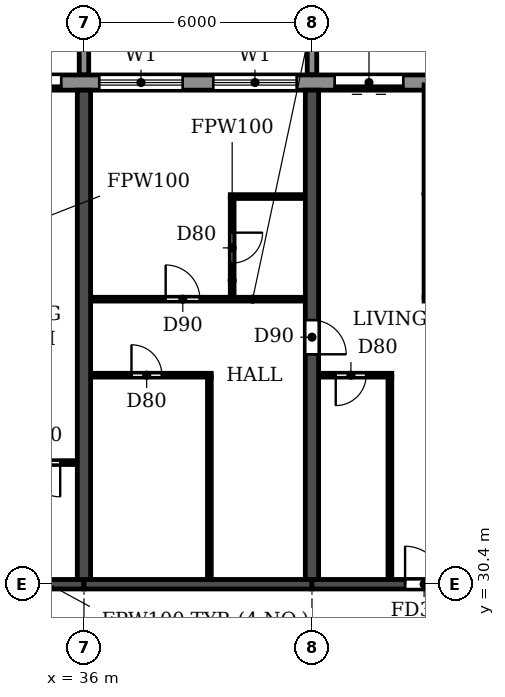
"""IFC4 building model, lengths in metres.
Left out: names, types, materials, properties, quantities, classifications, styles, units other than length and angle.
Written with IfcOpenShell. Run it as: python <this file> out.ifc"""

import sys

from ifc_helpers import new_model, si_unit, direction, frame, frame_2d, origin, place, context, subcontext, project, spatial, polyline, rectangle, outline, extrude, source, transform, mapped, element, fill, save


model = new_model("IFC4")
c1 = context("Model", 3, precision=1e-05, world=origin(), true_north=direction((0.0, 1.0)))
c2 = subcontext(c1, "Body", "Model", "MODEL_VIEW")
j1 = project(units=[si_unit("LENGTHUNIT", "METRE"), si_unit("PLANEANGLEUNIT", "RADIAN")], contexts=[c1])
p1 = place(None, origin())
s1 = spatial("IfcSite", under=j1, at=p1, CompositionType="ELEMENT")
p2 = place(p1, origin())
s2 = spatial("IfcBuilding", under=s1, at=p2, CompositionType="ELEMENT")
p3 = place(p2, frame((0.0, 0.0, 76.2)))
s3 = spatial("IfcBuildingStorey", under=s2, at=p3, CompositionType="ELEMENT", Elevation=76.2)
p4 = place(p3, frame((36.0, 30.525, 0.0), z_axis=(0.0, 0.0, 1.0), x_axis=(0.0, 1.0, 0.0)))
e1 = element("IfcWall", 1, at=p4, inside=s3, PredefinedType="SHEAR", context=c2, shape_type="SweptSolid", body=[
    extrude(rectangle(XDim=12.875, YDim=0.35, at=frame_2d((6.438, 0.0))), origin(), (0.0, 0.0, 1.0), 3.06),
])
p5 = place(p3, frame((42.0, 30.525, 0.0), z_axis=(0.0, 0.0, 1.0), x_axis=(0.0, 1.0, 0.0)))
e2 = element("IfcWall", 2, at=p5, inside=s3, PredefinedType="SHEAR", context=c2, shape_type="SweptSolid", body=[
    extrude(rectangle(XDim=12.875, YDim=0.35, at=frame_2d((6.438, 0.0))), origin(), (0.0, 0.0, 1.0), 3.06),
])
p6 = place(p5, frame((5.925, 0.0, 0.0)))
e3 = element("IfcOpeningElement", 3, at=p6, cuts=e2, PredefinedType="OPENING", context=c2, shape_type="SweptSolid", body=[
    extrude(rectangle(XDim=0.9, YDim=2.1, at=frame_2d((0.45, 1.05))), frame((0.0, 0.185, 0.0), z_axis=(0.0, -1.0, 0.0), x_axis=(1.0, 0.0, 0.0)), (0.0, 0.0, 1.0), 0.37),
])
p7 = place(p3, frame((30.0, 30.4, 0.0), z_axis=(0.0, 0.0, 1.0), x_axis=(1.0, 0.0, 0.0)))
e4 = element("IfcWall", 4, at=p7, inside=s3, PredefinedType="SHEAR", context=c2, shape_type="SweptSolid", body=[
    extrude(rectangle(XDim=6.0, YDim=0.25, at=frame_2d((3.0, 0.0))), origin(), (0.0, 0.0, 1.0), 2.46),
])
p8 = place(p7, frame((2.45, 0.0, 0.0)))
e5 = element("IfcOpeningElement", 5, at=p8, cuts=e4, PredefinedType="OPENING", context=c2, shape_type="SweptSolid", body=[
    extrude(rectangle(XDim=1.0, YDim=2.1, at=frame_2d((0.5, 1.05))), frame((0.0, 0.135, 0.0), z_axis=(0.0, -1.0, 0.0), x_axis=(1.0, 0.0, 0.0)), (0.0, 0.0, 1.0), 0.27),
])
p9 = place(p3, frame((36.0, 30.4, 0.0), z_axis=(0.0, 0.0, 1.0), x_axis=(1.0, 0.0, 0.0)))
e6 = element("IfcWall", 6, at=p9, inside=s3, PredefinedType="SHEAR", context=c2, shape_type="SweptSolid", body=[
    extrude(rectangle(XDim=6.0, YDim=0.25, at=frame_2d((3.0, 0.0))), origin(), (0.0, 0.0, 1.0), 2.46),
])
p10 = place(p3, frame((42.0, 30.4, 0.0), z_axis=(0.0, 0.0, 1.0), x_axis=(1.0, 0.0, 0.0)))
e7 = element("IfcWall", 7, at=p10, inside=s3, PredefinedType="SHEAR", context=c2, shape_type="SweptSolid", body=[
    extrude(rectangle(XDim=6.0, YDim=0.25, at=frame_2d((3.0, 0.0))), origin(), (0.0, 0.0, 1.0), 2.46),
])
p11 = place(p10, frame((2.45, 0.0, 0.0)))
e8 = element("IfcOpeningElement", 8, at=p11, cuts=e7, PredefinedType="OPENING", context=c2, shape_type="SweptSolid", body=[
    extrude(rectangle(XDim=1.0, YDim=2.1, at=frame_2d((0.5, 1.05))), frame((0.0, 0.135, 0.0), z_axis=(0.0, -1.0, 0.0), x_axis=(1.0, 0.0, 0.0)), (0.0, 0.0, 1.0), 0.27),
])
p12 = place(p3, frame((91.317, 43.6, 0.0), z_axis=(0.0, 0.0, 1.0), x_axis=(-1.0, 0.0, 0.0)))
e9 = element("IfcWall", 9, at=p12, inside=s3, PredefinedType="STANDARD", context=c2, shape_type="SweptSolid", body=[
    extrude(rectangle(XDim=80.634, YDim=0.4, at=frame_2d((40.317, 0.0))), origin(), (0.0, 0.0, 1.0), 3.06),
])
p13 = place(p12, frame((76.717, 0.0, 0.9)))
e10 = element("IfcOpeningElement", 10, at=p13, cuts=e9, PredefinedType="OPENING", context=c2, shape_type="SweptSolid", body=[
    extrude(rectangle(XDim=2.2, YDim=1.5, at=frame_2d((1.1, 0.75))), frame((0.0, 0.21, 0.0), z_axis=(0.0, -1.0, 0.0), x_axis=(1.0, 0.0, 0.0)), (0.0, 0.0, 1.0), 0.42),
])
p14 = place(p12, frame((73.917, 0.0, 0.0)))
e11 = element("IfcOpeningElement", 11, at=p14, cuts=e9, PredefinedType="OPENING", context=c2, shape_type="SweptSolid", body=[
    extrude(rectangle(XDim=1.8, YDim=2.4, at=frame_2d((0.9, 1.2))), frame((0.0, 0.21, 0.0), z_axis=(0.0, -1.0, 0.0), x_axis=(1.0, 0.0, 0.0)), (0.0, 0.0, 1.0), 0.42),
])
p15 = place(p12, frame((70.917, 0.0, 0.0)))
e12 = element("IfcOpeningElement", 12, at=p15, cuts=e9, PredefinedType="OPENING", context=c2, shape_type="SweptSolid", body=[
    extrude(rectangle(XDim=1.8, YDim=2.4, at=frame_2d((0.9, 1.2))), frame((0.0, 0.21, 0.0), z_axis=(0.0, -1.0, 0.0), x_axis=(1.0, 0.0, 0.0)), (0.0, 0.0, 1.0), 0.42),
])
p16 = place(p12, frame((67.717, 0.0, 0.9)))
e13 = element("IfcOpeningElement", 13, at=p16, cuts=e9, PredefinedType="OPENING", context=c2, shape_type="SweptSolid", body=[
    extrude(rectangle(XDim=2.2, YDim=1.5, at=frame_2d((1.1, 0.75))), frame((0.0, 0.21, 0.0), z_axis=(0.0, -1.0, 0.0), x_axis=(1.0, 0.0, 0.0)), (0.0, 0.0, 1.0), 0.42),
])
p17 = place(p12, frame((64.717, 0.0, 0.9)))
e14 = element("IfcOpeningElement", 14, at=p17, cuts=e9, PredefinedType="OPENING", context=c2, shape_type="SweptSolid", body=[
    extrude(rectangle(XDim=2.2, YDim=1.5, at=frame_2d((1.1, 0.75))), frame((0.0, 0.21, 0.0), z_axis=(0.0, -1.0, 0.0), x_axis=(1.0, 0.0, 0.0)), (0.0, 0.0, 1.0), 0.42),
])
p18 = place(p12, frame((61.917, 0.0, 0.0)))
e15 = element("IfcOpeningElement", 15, at=p18, cuts=e9, PredefinedType="OPENING", context=c2, shape_type="SweptSolid", body=[
    extrude(rectangle(XDim=1.8, YDim=2.4, at=frame_2d((0.9, 1.2))), frame((0.0, 0.21, 0.0), z_axis=(0.0, -1.0, 0.0), x_axis=(1.0, 0.0, 0.0)), (0.0, 0.0, 1.0), 0.42),
])
p19 = place(p12, frame((58.717, 0.0, 0.9)))
e16 = element("IfcOpeningElement", 16, at=p19, cuts=e9, PredefinedType="OPENING", context=c2, shape_type="SweptSolid", body=[
    extrude(rectangle(XDim=2.2, YDim=1.5, at=frame_2d((1.1, 0.75))), frame((0.0, 0.21, 0.0), z_axis=(0.0, -1.0, 0.0), x_axis=(1.0, 0.0, 0.0)), (0.0, 0.0, 1.0), 0.42),
])
p20 = place(p12, frame((55.917, 0.0, 0.0)))
e17 = element("IfcOpeningElement", 17, at=p20, cuts=e9, PredefinedType="OPENING", context=c2, shape_type="SweptSolid", body=[
    extrude(rectangle(XDim=1.8, YDim=2.4, at=frame_2d((0.9, 1.2))), frame((0.0, 0.21, 0.0), z_axis=(0.0, -1.0, 0.0), x_axis=(1.0, 0.0, 0.0)), (0.0, 0.0, 1.0), 0.42),
])
p21 = place(p12, frame((52.717, 0.0, 0.9)))
e18 = element("IfcOpeningElement", 18, at=p21, cuts=e9, PredefinedType="OPENING", context=c2, shape_type="SweptSolid", body=[
    extrude(rectangle(XDim=2.2, YDim=1.5, at=frame_2d((1.1, 0.75))), frame((0.0, 0.21, 0.0), z_axis=(0.0, -1.0, 0.0), x_axis=(1.0, 0.0, 0.0)), (0.0, 0.0, 1.0), 0.42),
])
p22 = place(p12, frame((49.717, 0.0, 0.9)))
e19 = element("IfcOpeningElement", 19, at=p22, cuts=e9, PredefinedType="OPENING", context=c2, shape_type="SweptSolid", body=[
    extrude(rectangle(XDim=2.2, YDim=1.5, at=frame_2d((1.1, 0.75))), frame((0.0, 0.21, 0.0), z_axis=(0.0, -1.0, 0.0), x_axis=(1.0, 0.0, 0.0)), (0.0, 0.0, 1.0), 0.42),
])
p23 = place(p12, frame((46.917, 0.0, 0.0)))
e20 = element("IfcOpeningElement", 20, at=p23, cuts=e9, PredefinedType="OPENING", context=c2, shape_type="SweptSolid", body=[
    extrude(rectangle(XDim=1.8, YDim=2.4, at=frame_2d((0.9, 1.2))), frame((0.0, 0.21, 0.0), z_axis=(0.0, -1.0, 0.0), x_axis=(1.0, 0.0, 0.0)), (0.0, 0.0, 1.0), 0.42),
])
p24 = place(p12, frame((43.717, 0.0, 0.9)))
e21 = element("IfcOpeningElement", 21, at=p24, cuts=e9, PredefinedType="OPENING", context=c2, shape_type="SweptSolid", body=[
    extrude(rectangle(XDim=2.2, YDim=1.5, at=frame_2d((1.1, 0.75))), frame((0.0, 0.21, 0.0), z_axis=(0.0, -1.0, 0.0), x_axis=(1.0, 0.0, 0.0)), (0.0, 0.0, 1.0), 0.42),
])
p25 = place(p12, frame((40.717, 0.0, 0.9)))
e22 = element("IfcOpeningElement", 22, at=p25, cuts=e9, PredefinedType="OPENING", context=c2, shape_type="SweptSolid", body=[
    extrude(rectangle(XDim=2.2, YDim=1.5, at=frame_2d((1.1, 0.75))), frame((0.0, 0.21, 0.0), z_axis=(0.0, -1.0, 0.0), x_axis=(1.0, 0.0, 0.0)), (0.0, 0.0, 1.0), 0.42),
])
p26 = place(p12, frame((37.917, 0.0, 0.0)))
e23 = element("IfcOpeningElement", 23, at=p26, cuts=e9, PredefinedType="OPENING", context=c2, shape_type="SweptSolid", body=[
    extrude(rectangle(XDim=1.8, YDim=2.4, at=frame_2d((0.9, 1.2))), frame((0.0, 0.21, 0.0), z_axis=(0.0, -1.0, 0.0), x_axis=(1.0, 0.0, 0.0)), (0.0, 0.0, 1.0), 0.42),
])
p27 = place(p12, frame((34.717, 0.0, 0.9)))
e24 = element("IfcOpeningElement", 24, at=p27, cuts=e9, PredefinedType="OPENING", context=c2, shape_type="SweptSolid", body=[
    extrude(rectangle(XDim=2.2, YDim=1.5, at=frame_2d((1.1, 0.75))), frame((0.0, 0.21, 0.0), z_axis=(0.0, -1.0, 0.0), x_axis=(1.0, 0.0, 0.0)), (0.0, 0.0, 1.0), 0.42),
])
p28 = place(p12, frame((31.917, 0.0, 0.0)))
e25 = element("IfcOpeningElement", 25, at=p28, cuts=e9, PredefinedType="OPENING", context=c2, shape_type="SweptSolid", body=[
    extrude(rectangle(XDim=1.8, YDim=2.4, at=frame_2d((0.9, 1.2))), frame((0.0, 0.21, 0.0), z_axis=(0.0, -1.0, 0.0), x_axis=(1.0, 0.0, 0.0)), (0.0, 0.0, 1.0), 0.42),
])
p29 = place(p12, frame((28.717, 0.0, 0.9)))
e26 = element("IfcOpeningElement", 26, at=p29, cuts=e9, PredefinedType="OPENING", context=c2, shape_type="SweptSolid", body=[
    extrude(rectangle(XDim=2.2, YDim=1.5, at=frame_2d((1.1, 0.75))), frame((0.0, 0.21, 0.0), z_axis=(0.0, -1.0, 0.0), x_axis=(1.0, 0.0, 0.0)), (0.0, 0.0, 1.0), 0.42),
])
p30 = place(p12, frame((25.717, 0.0, 0.9)))
e27 = element("IfcOpeningElement", 27, at=p30, cuts=e9, PredefinedType="OPENING", context=c2, shape_type="SweptSolid", body=[
    extrude(rectangle(XDim=2.2, YDim=1.5, at=frame_2d((1.1, 0.75))), frame((0.0, 0.21, 0.0), z_axis=(0.0, -1.0, 0.0), x_axis=(1.0, 0.0, 0.0)), (0.0, 0.0, 1.0), 0.42),
])
p31 = place(p12, frame((22.717, 0.0, 0.9)))
e28 = element("IfcOpeningElement", 28, at=p31, cuts=e9, PredefinedType="OPENING", context=c2, shape_type="SweptSolid", body=[
    extrude(rectangle(XDim=2.2, YDim=1.5, at=frame_2d((1.1, 0.75))), frame((0.0, 0.21, 0.0), z_axis=(0.0, -1.0, 0.0), x_axis=(1.0, 0.0, 0.0)), (0.0, 0.0, 1.0), 0.42),
])
p32 = place(p12, frame((19.917, 0.0, 0.0)))
e29 = element("IfcOpeningElement", 29, at=p32, cuts=e9, PredefinedType="OPENING", context=c2, shape_type="SweptSolid", body=[
    extrude(rectangle(XDim=1.8, YDim=2.4, at=frame_2d((0.9, 1.2))), frame((0.0, 0.21, 0.0), z_axis=(0.0, -1.0, 0.0), x_axis=(1.0, 0.0, 0.0)), (0.0, 0.0, 1.0), 0.42),
])
p33 = place(p12, frame((16.717, 0.0, 0.9)))
e30 = element("IfcOpeningElement", 30, at=p33, cuts=e9, PredefinedType="OPENING", context=c2, shape_type="SweptSolid", body=[
    extrude(rectangle(XDim=2.2, YDim=1.5, at=frame_2d((1.1, 0.75))), frame((0.0, 0.21, 0.0), z_axis=(0.0, -1.0, 0.0), x_axis=(1.0, 0.0, 0.0)), (0.0, 0.0, 1.0), 0.42),
])
p34 = place(p12, frame((13.717, 0.0, 0.9)))
e31 = element("IfcOpeningElement", 31, at=p34, cuts=e9, PredefinedType="OPENING", context=c2, shape_type="SweptSolid", body=[
    extrude(rectangle(XDim=2.2, YDim=1.5, at=frame_2d((1.1, 0.75))), frame((0.0, 0.21, 0.0), z_axis=(0.0, -1.0, 0.0), x_axis=(1.0, 0.0, 0.0)), (0.0, 0.0, 1.0), 0.42),
])
p35 = place(p12, frame((10.717, 0.0, 0.9)))
e32 = element("IfcOpeningElement", 32, at=p35, cuts=e9, PredefinedType="OPENING", context=c2, shape_type="SweptSolid", body=[
    extrude(rectangle(XDim=2.2, YDim=1.5, at=frame_2d((1.1, 0.75))), frame((0.0, 0.21, 0.0), z_axis=(0.0, -1.0, 0.0), x_axis=(1.0, 0.0, 0.0)), (0.0, 0.0, 1.0), 0.42),
])
p36 = place(p12, frame((7.917, 0.0, 0.0)))
e33 = element("IfcOpeningElement", 33, at=p36, cuts=e9, PredefinedType="OPENING", context=c2, shape_type="SweptSolid", body=[
    extrude(rectangle(XDim=1.8, YDim=2.4, at=frame_2d((0.9, 1.2))), frame((0.0, 0.21, 0.0), z_axis=(0.0, -1.0, 0.0), x_axis=(1.0, 0.0, 0.0)), (0.0, 0.0, 1.0), 0.42),
])
p37 = place(p12, frame((4.717, 0.0, 0.9)))
e34 = element("IfcOpeningElement", 34, at=p37, cuts=e9, PredefinedType="OPENING", context=c2, shape_type="SweptSolid", body=[
    extrude(rectangle(XDim=2.2, YDim=1.5, at=frame_2d((1.1, 0.75))), frame((0.0, 0.21, 0.0), z_axis=(0.0, -1.0, 0.0), x_axis=(1.0, 0.0, 0.0)), (0.0, 0.0, 1.0), 0.42),
])
p38 = place(p12, frame((1.917, 0.0, 0.0)))
e35 = element("IfcOpeningElement", 35, at=p38, cuts=e9, PredefinedType="OPENING", context=c2, shape_type="SweptSolid", body=[
    extrude(rectangle(XDim=1.8, YDim=2.4, at=frame_2d((0.9, 1.2))), frame((0.0, 0.21, 0.0), z_axis=(0.0, -1.0, 0.0), x_axis=(1.0, 0.0, 0.0)), (0.0, 0.0, 1.0), 0.42),
])
m1 = source(origin(), c2, "Body", "SweptSolid", [
    extrude(outline(polyline([(0.0, 0.0), (0.25, 0.0), (0.25, 3.1), (0.0, 3.1), (0.0, 0.0)])), origin(), (0.0, 0.0, 1.0), 3.1),
])
for number, where in (
    (36, (35.875, 43.8, 0.0)),
    (37, (41.875, 43.8, 0.0)),
):
    element("IfcWall", number, at=place(p3, frame(where)), inside=s3, PredefinedType="STANDARD", context=c2, shape_type="MappedRepresentation", body=[
        mapped(m1, transform((0.0, 0.0, 0.0))),
    ])
p39 = place(p3, frame((33.8, 33.6, 0.0), z_axis=(0.0, 0.0, 1.0), x_axis=(1.0, 0.0, 0.0)))
e38 = element("IfcWall", 38, at=p39, inside=s3, PredefinedType="PARTITIONING", context=c2, shape_type="SweptSolid", body=[
    extrude(rectangle(XDim=2.015, YDim=0.1, at=frame_2d((1.007, 0.0))), origin(), (0.0, 0.0, 1.0), 3.06),
])
p40 = place(p39, frame((0.675, 0.0, 0.0)))
e39 = element("IfcOpeningElement", 39, at=p40, cuts=e38, PredefinedType="OPENING", context=c2, shape_type="SweptSolid", body=[
    extrude(rectangle(XDim=0.9, YDim=2.1, at=frame_2d((0.45, 1.05))), frame((0.0, 0.06, 0.0), z_axis=(0.0, -1.0, 0.0), x_axis=(1.0, 0.0, 0.0)), (0.0, 0.0, 1.0), 0.12),
])
p41 = place(p3, frame((36.185, 35.9, 0.0), z_axis=(0.0, 0.0, 1.0), x_axis=(1.0, 0.0, 0.0)))
e40 = element("IfcWall", 40, at=p41, inside=s3, PredefinedType="PARTITIONING", context=c2, shape_type="SweptSolid", body=[
    extrude(rectangle(XDim=3.165, YDim=0.1, at=frame_2d((1.583, 0.0))), origin(), (0.0, 0.0, 1.0), 3.06),
])
p42 = place(p41, frame((1.065, 0.0, 0.0)))
e41 = element("IfcOpeningElement", 41, at=p42, cuts=e40, PredefinedType="OPENING", context=c2, shape_type="SweptSolid", body=[
    extrude(rectangle(XDim=0.8, YDim=2.1, at=frame_2d((0.4, 1.05))), frame((0.0, 0.06, 0.0), z_axis=(0.0, -1.0, 0.0), x_axis=(1.0, 0.0, 0.0)), (0.0, 0.0, 1.0), 0.12),
])
p43 = place(p3, frame((42.185, 35.9, 0.0), z_axis=(0.0, 0.0, 1.0), x_axis=(1.0, 0.0, 0.0)))
e42 = element("IfcWall", 42, at=p43, inside=s3, PredefinedType="PARTITIONING", context=c2, shape_type="SweptSolid", body=[
    extrude(rectangle(XDim=1.915, YDim=0.1, at=frame_2d((0.958, 0.0))), origin(), (0.0, 0.0, 1.0), 3.06),
])
p44 = place(p43, frame((0.44, 0.0, 0.0)))
e43 = element("IfcOpeningElement", 43, at=p44, cuts=e42, PredefinedType="OPENING", context=c2, shape_type="SweptSolid", body=[
    extrude(rectangle(XDim=0.8, YDim=2.1, at=frame_2d((0.4, 1.05))), frame((0.0, 0.06, 0.0), z_axis=(0.0, -1.0, 0.0), x_axis=(1.0, 0.0, 0.0)), (0.0, 0.0, 1.0), 0.12),
])
p45 = place(p3, frame((36.185, 37.9, 0.0), z_axis=(0.0, 0.0, 1.0), x_axis=(1.0, 0.0, 0.0)))
e44 = element("IfcWall", 44, at=p45, inside=s3, PredefinedType="PARTITIONING", context=c2, shape_type="SweptSolid", body=[
    extrude(rectangle(XDim=5.63, YDim=0.1, at=frame_2d((2.815, 0.0))), origin(), (0.0, 0.0, 1.0), 3.06),
])
p46 = place(p45, frame((1.965, 0.0, 0.0)))
e45 = element("IfcOpeningElement", 45, at=p46, cuts=e44, PredefinedType="OPENING", context=c2, shape_type="SweptSolid", body=[
    extrude(rectangle(XDim=0.9, YDim=2.1, at=frame_2d((0.45, 1.05))), frame((0.0, 0.06, 0.0), z_axis=(0.0, -1.0, 0.0), x_axis=(1.0, 0.0, 0.0)), (0.0, 0.0, 1.0), 0.12),
])
p47 = place(p3, frame((44.95, 37.9, 0.0), z_axis=(0.0, 0.0, 1.0), x_axis=(1.0, 0.0, 0.0)))
e46 = element("IfcWall", 46, at=p47, inside=s3, PredefinedType="PARTITIONING", context=c2, shape_type="SweptSolid", body=[
    extrude(rectangle(XDim=2.865, YDim=0.1, at=frame_2d((1.433, 0.0))), origin(), (0.0, 0.0, 1.0), 3.06),
])
p48 = place(p47, frame((1.65, 0.0, 0.0)))
e47 = element("IfcOpeningElement", 47, at=p48, cuts=e46, PredefinedType="OPENING", context=c2, shape_type="SweptSolid", body=[
    extrude(rectangle(XDim=0.9, YDim=2.1, at=frame_2d((0.45, 1.05))), frame((0.0, 0.06, 0.0), z_axis=(0.0, -1.0, 0.0), x_axis=(1.0, 0.0, 0.0)), (0.0, 0.0, 1.0), 0.12),
])
p49 = place(p3, frame((39.85, 40.6, 0.0), z_axis=(0.0, 0.0, 1.0), x_axis=(1.0, 0.0, 0.0)))
e48 = element("IfcWall", 48, at=p49, inside=s3, PredefinedType="PARTITIONING", context=c2, shape_type="SweptSolid", body=[
    extrude(rectangle(XDim=1.965, YDim=0.1, at=frame_2d((0.982, 0.0))), origin(), (0.0, 0.0, 1.0), 3.06),
])
p50 = place(p3, frame((39.3, 30.535, 0.0), z_axis=(0.0, 0.0, 1.0), x_axis=(0.0, 1.0, 0.0)))
e49 = element("IfcWall", 49, at=p50, inside=s3, PredefinedType="PARTITIONING", context=c2, shape_type="SweptSolid", body=[
    extrude(rectangle(XDim=5.315, YDim=0.1, at=frame_2d((2.658, 0.0))), origin(), (0.0, 0.0, 1.0), 3.06),
])
p51 = place(p3, frame((39.9, 37.95, 0.0), z_axis=(0.0, 0.0, 1.0), x_axis=(0.0, 1.0, 0.0)))
e50 = element("IfcWall", 50, at=p51, inside=s3, PredefinedType="PARTITIONING", context=c2, shape_type="SweptSolid", body=[
    extrude(rectangle(XDim=2.6, YDim=0.1, at=frame_2d((1.3, 0.0))), origin(), (0.0, 0.0, 1.0), 3.06),
])
p52 = place(p51, frame((0.9, 0.0, 0.0)))
e51 = element("IfcOpeningElement", 51, at=p52, cuts=e50, PredefinedType="OPENING", context=c2, shape_type="SweptSolid", body=[
    extrude(rectangle(XDim=0.8, YDim=2.1, at=frame_2d((0.4, 1.05))), frame((0.0, 0.06, 0.0), z_axis=(0.0, -1.0, 0.0), x_axis=(1.0, 0.0, 0.0)), (0.0, 0.0, 1.0), 0.12),
])
p53 = place(p3, frame((44.05, 30.535, 0.0), z_axis=(0.0, 0.0, 1.0), x_axis=(0.0, 1.0, 0.0)))
e52 = element("IfcWall", 52, at=p53, inside=s3, PredefinedType="PARTITIONING", context=c2, shape_type="SweptSolid", body=[
    extrude(rectangle(XDim=5.315, YDim=0.1, at=frame_2d((2.658, 0.0))), origin(), (0.0, 0.0, 1.0), 3.06),
])
p54 = place(p3, frame((45.0, 37.95, 0.0), z_axis=(0.0, 0.0, 1.0), x_axis=(0.0, 1.0, 0.0)))
e53 = element("IfcWall", 53, at=p54, inside=s3, PredefinedType="PARTITIONING", context=c2, shape_type="SweptSolid", body=[
    extrude(rectangle(XDim=5.59, YDim=0.1, at=frame_2d((2.795, 0.0))), origin(), (0.0, 0.0, 1.0), 3.06),
])
p55 = place(p20, origin())
e54 = element("IfcDoor", 54, at=p55, inside=s3, OperationType="DOUBLE_DOOR_SLIDING", PredefinedType="DOOR", context=c2, shape_type="SweptSolid", body=[
    extrude(rectangle(XDim=1.8, YDim=2.4, at=frame_2d((0.9, 1.2))), frame((0.0, 0.025, 0.0), z_axis=(0.0, -1.0, 0.0), x_axis=(1.0, 0.0, 0.0)), (0.0, 0.0, 1.0), 0.05),
])
fill(e17, e54)
p56 = place(p21, origin())
e55 = element("IfcWindow", 55, at=p56, inside=s3, PartitioningType="DOUBLE_PANEL_HORIZONTAL", PredefinedType="WINDOW", context=c2, shape_type="SweptSolid", body=[
    extrude(rectangle(XDim=2.2, YDim=1.5, at=frame_2d((1.1, 0.75))), frame((0.0, 0.03, 0.0), z_axis=(0.0, -1.0, 0.0), x_axis=(1.0, 0.0, 0.0)), (0.0, 0.0, 1.0), 0.06),
])
fill(e18, e55)
p57 = place(p22, origin())
e56 = element("IfcWindow", 56, at=p57, inside=s3, PartitioningType="DOUBLE_PANEL_HORIZONTAL", PredefinedType="WINDOW", context=c2, shape_type="SweptSolid", body=[
    extrude(rectangle(XDim=2.2, YDim=1.5, at=frame_2d((1.1, 0.75))), frame((0.0, 0.03, 0.0), z_axis=(0.0, -1.0, 0.0), x_axis=(1.0, 0.0, 0.0)), (0.0, 0.0, 1.0), 0.06),
])
fill(e19, e56)
p58 = place(p23, origin())
e57 = element("IfcDoor", 57, at=p58, inside=s3, OperationType="DOUBLE_DOOR_SLIDING", PredefinedType="DOOR", context=c2, shape_type="SweptSolid", body=[
    extrude(rectangle(XDim=1.8, YDim=2.4, at=frame_2d((0.9, 1.2))), frame((0.0, 0.025, 0.0), z_axis=(0.0, -1.0, 0.0), x_axis=(1.0, 0.0, 0.0)), (0.0, 0.0, 1.0), 0.05),
])
fill(e20, e57)
p59 = place(p40, frame((0.9, 0.0, 0.0), z_axis=(0.0, 0.0, 1.0), x_axis=(-1.0, 0.0, 0.0)))
e58 = element("IfcDoor", 58, at=p59, inside=s3, OperationType="SINGLE_SWING_LEFT", PredefinedType="DOOR", context=c2, shape_type="SweptSolid", body=[
    extrude(rectangle(XDim=0.9, YDim=2.1, at=frame_2d((0.45, 1.05))), frame((0.0, 0.025, 0.0), z_axis=(0.0, -1.0, 0.0), x_axis=(1.0, 0.0, 0.0)), (0.0, 0.0, 1.0), 0.05),
])
fill(e39, e58)
p60 = place(p42, origin())
e59 = element("IfcDoor", 59, at=p60, inside=s3, OperationType="SINGLE_SWING_LEFT", PredefinedType="DOOR", context=c2, shape_type="SweptSolid", body=[
    extrude(rectangle(XDim=0.8, YDim=2.1, at=frame_2d((0.4, 1.05))), frame((0.0, 0.025, 0.0), z_axis=(0.0, -1.0, 0.0), x_axis=(1.0, 0.0, 0.0)), (0.0, 0.0, 1.0), 0.05),
])
fill(e41, e59)
p61 = place(p46, origin())
e60 = element("IfcDoor", 60, at=p61, inside=s3, OperationType="SINGLE_SWING_LEFT", PredefinedType="DOOR", context=c2, shape_type="SweptSolid", body=[
    extrude(rectangle(XDim=0.9, YDim=2.1, at=frame_2d((0.45, 1.05))), frame((0.0, 0.025, 0.0), z_axis=(0.0, -1.0, 0.0), x_axis=(1.0, 0.0, 0.0)), (0.0, 0.0, 1.0), 0.05),
])
fill(e45, e60)
p62 = place(p6, frame((0.9, 0.0, 0.0), z_axis=(0.0, 0.0, 1.0), x_axis=(-1.0, 0.0, 0.0)))
e61 = element("IfcDoor", 61, at=p62, inside=s3, OperationType="SINGLE_SWING_RIGHT", PredefinedType="DOOR", context=c2, shape_type="SweptSolid", body=[
    extrude(rectangle(XDim=0.9, YDim=2.1, at=frame_2d((0.45, 1.05))), frame((0.0, 0.025, 0.0), z_axis=(0.0, -1.0, 0.0), x_axis=(1.0, 0.0, 0.0)), (0.0, 0.0, 1.0), 0.05),
])
fill(e3, e61)
p63 = place(p44, frame((0.8, 0.0, 0.0), z_axis=(0.0, 0.0, 1.0), x_axis=(-1.0, 0.0, 0.0)))
e62 = element("IfcDoor", 62, at=p63, inside=s3, OperationType="SINGLE_SWING_RIGHT", PredefinedType="DOOR", context=c2, shape_type="SweptSolid", body=[
    extrude(rectangle(XDim=0.8, YDim=2.1, at=frame_2d((0.4, 1.05))), frame((0.0, 0.025, 0.0), z_axis=(0.0, -1.0, 0.0), x_axis=(1.0, 0.0, 0.0)), (0.0, 0.0, 1.0), 0.05),
])
fill(e43, e62)
p64 = place(p11, origin())
e63 = element("IfcDoor", 63, at=p64, inside=s3, OperationType="SINGLE_SWING_LEFT", PredefinedType="DOOR", context=c2, shape_type="SweptSolid", body=[
    extrude(rectangle(XDim=1.0, YDim=2.1, at=frame_2d((0.5, 1.05))), frame((0.0, 0.025, 0.0), z_axis=(0.0, -1.0, 0.0), x_axis=(1.0, 0.0, 0.0)), (0.0, 0.0, 1.0), 0.05),
])
fill(e8, e63)
p65 = place(p52, frame((0.8, 0.0, 0.0), z_axis=(0.0, 0.0, 1.0), x_axis=(-1.0, 0.0, 0.0)))
e64 = element("IfcDoor", 64, at=p65, inside=s3, OperationType="SINGLE_SWING_LEFT", PredefinedType="DOOR", context=c2, shape_type="SweptSolid", body=[
    extrude(rectangle(XDim=0.8, YDim=2.1, at=frame_2d((0.4, 1.05))), frame((0.0, 0.025, 0.0), z_axis=(0.0, -1.0, 0.0), x_axis=(1.0, 0.0, 0.0)), (0.0, 0.0, 1.0), 0.05),
])
fill(e51, e64)
save(model, sys.argv[1])
